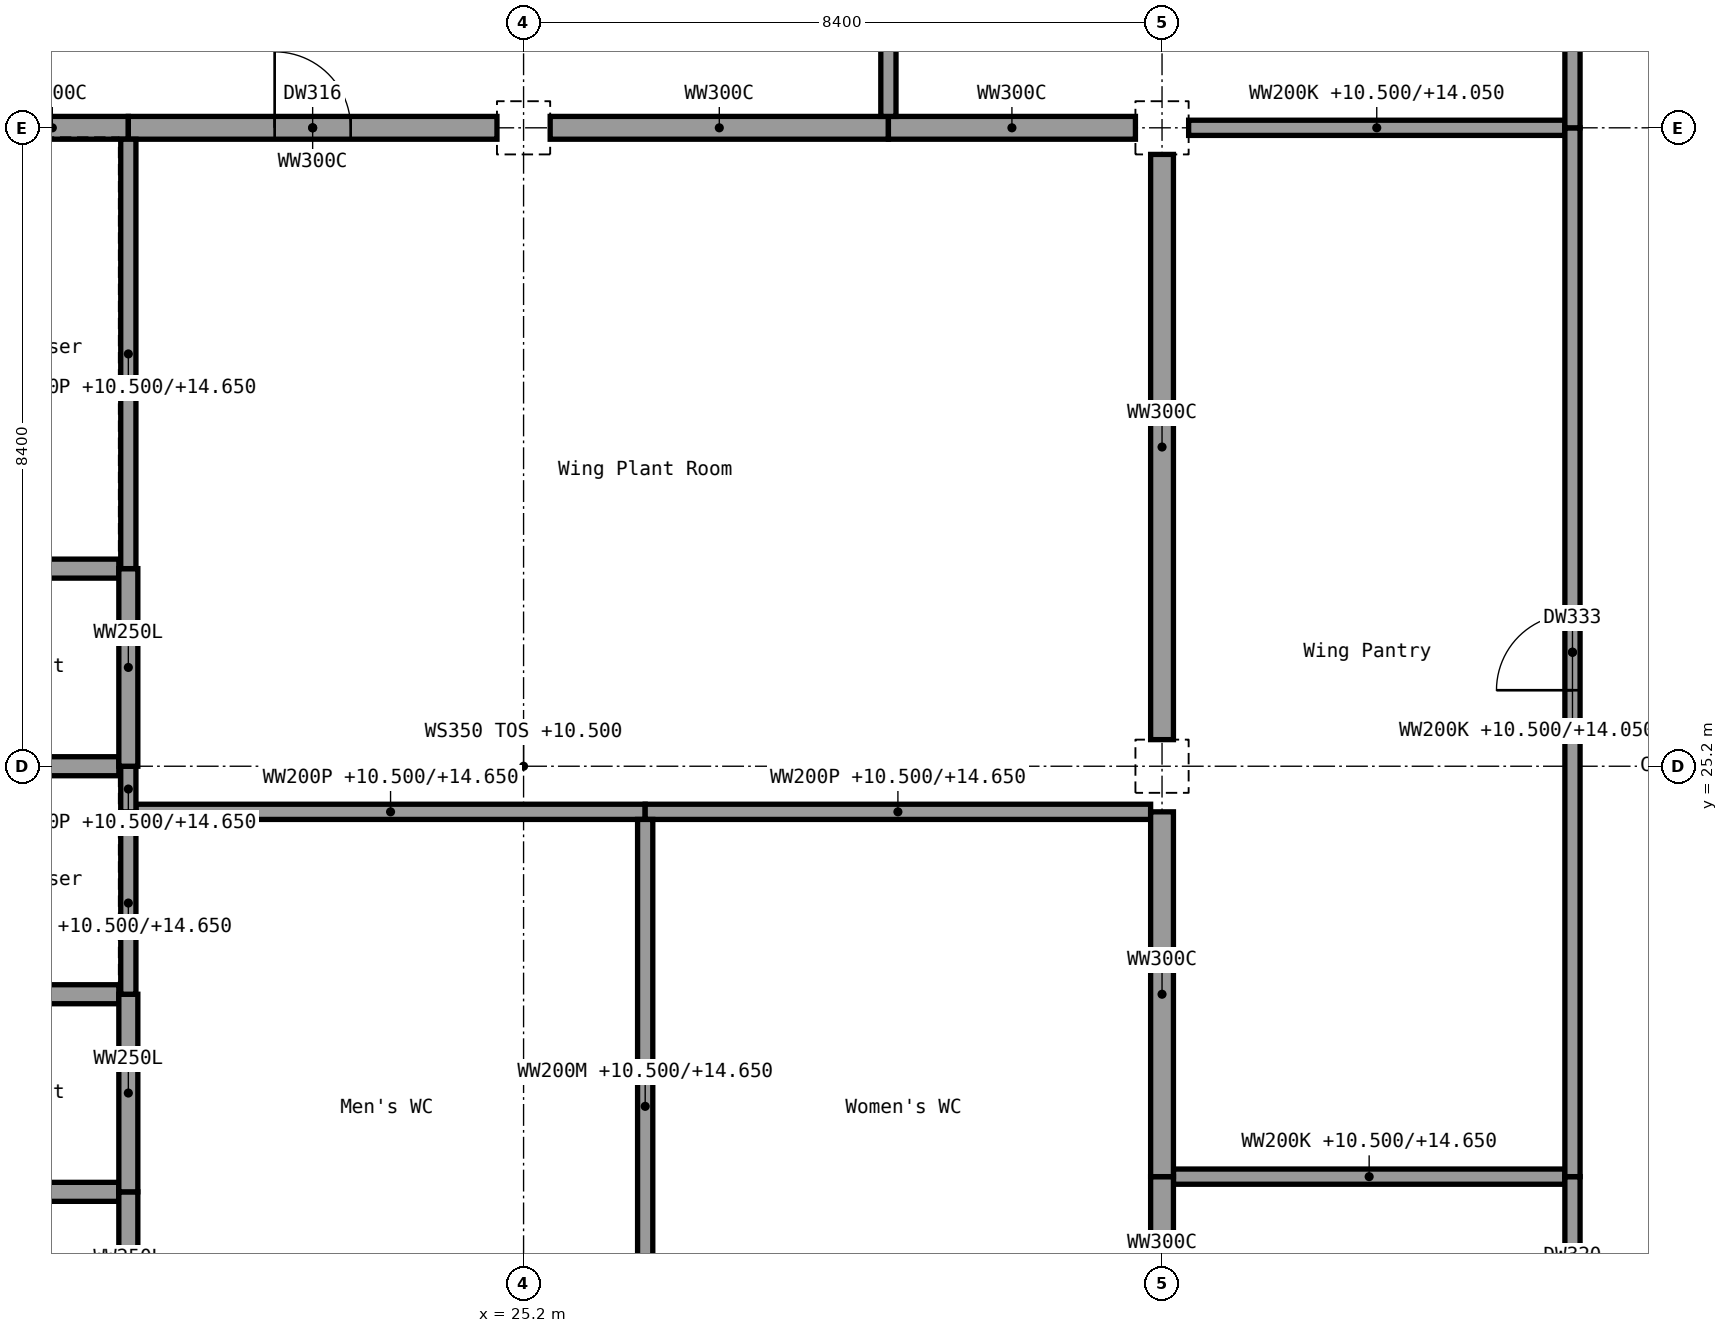
"""IFC4 building model, lengths in metres.
Left out: names, types, materials, properties, quantities, classifications, styles, units other than length and angle.
Written with IfcOpenShell. Run it as: python <this file> out.ifc"""

import sys

from ifc_helpers import new_model, si_unit, direction, frame, frame_2d, origin, origin_2d, place, context, subcontext, project, spatial, rectangle, extrude, element, fill, save


model = new_model("IFC4")
c1 = context("Model", 3, precision=1e-05, world=origin(), true_north=direction((0.0, 1.0)))
c2 = subcontext(c1, "Body", "Model", "MODEL_VIEW")
j1 = project(units=[si_unit("LENGTHUNIT", "METRE"), si_unit("PLANEANGLEUNIT", "RADIAN")], contexts=[c1])
p1 = place(None, origin())
s1 = spatial("IfcSite", under=j1, at=p1, CompositionType="ELEMENT")
p2 = place(p1, origin())
s2 = spatial("IfcBuilding", under=s1, at=p2, CompositionType="ELEMENT")
p3 = place(p2, frame((0.0, 0.0, 10.5)))
s3 = spatial("IfcBuildingStorey", under=s2, at=p3, CompositionType="ELEMENT", Elevation=10.5)
for number, where, z_axis, x_axis in (
    (1, (25.2, 33.6, 0.0), (0.0, 0.0, 1.0), (1.0, 0.0, 0.0)),
    (2, (33.6, 25.2, 0.0), (0.0, 0.0, 1.0), (1.0, 0.0, 0.0)),
    (3, (33.6, 33.6, 0.0), (0.0, 0.0, 1.0), (1.0, 0.0, 0.0)),
):
    element("IfcColumn", number, at=place(p3, frame(where, z_axis=z_axis, x_axis=x_axis)), inside=s3, PredefinedType="COLUMN", context=c2, shape_type="SweptSolid", body=[
        extrude(rectangle(XDim=0.7, YDim=0.7, at=origin_2d()), origin(), (0.0, 0.0, 1.0), 4.15),
    ])
p4 = place(p3, frame((16.925, 19.6, 0.0), z_axis=(0.0, 0.0, 1.0), x_axis=(1.0, 0.0, 0.0)))
e4 = element("IfcWall", 4, at=p4, inside=s3, PredefinedType="SHEAR", context=c2, shape_type="SweptSolid", body=[
    extrude(rectangle(XDim=2.95, YDim=0.25, at=frame_2d((1.475, 0.0))), origin(), (0.0, 0.0, 1.0), 4.15),
])
p5 = place(p3, frame((33.75, 19.8, 0.0), z_axis=(0.0, 0.0, 1.0), x_axis=(1.0, 0.0, 0.0)))
e5 = element("IfcWall", 5, at=p5, inside=s3, PredefinedType="SOLIDWALL", context=c2, shape_type="SweptSolid", body=[
    extrude(rectangle(XDim=5.15, YDim=0.2, at=frame_2d((2.575, 0.0))), origin(), (0.0, 0.0, 1.0), 4.15),
])
p6 = place(p3, frame((16.95, 22.2, 0.0), z_axis=(0.0, 0.0, 1.0), x_axis=(1.0, 0.0, 0.0)))
e6 = element("IfcWall", 6, at=p6, inside=s3, PredefinedType="SHEAR", context=c2, shape_type="SweptSolid", body=[
    extrude(rectangle(XDim=2.925, YDim=0.25, at=frame_2d((1.462, 0.0))), origin(), (0.0, 0.0, 1.0), 4.15),
])
p7 = place(p3, frame((20.1, 24.6, 0.0), z_axis=(0.0, 0.0, 1.0), x_axis=(1.0, 0.0, 0.0)))
e7 = element("IfcWall", 7, at=p7, inside=s3, PredefinedType="SOLIDWALL", context=c2, shape_type="SweptSolid", body=[
    extrude(rectangle(XDim=6.7, YDim=0.2, at=frame_2d((3.35, 0.0))), origin(), (0.0, 0.0, 1.0), 4.15),
])
p8 = place(p3, frame((26.8, 24.6, 0.0), z_axis=(0.0, 0.0, 1.0), x_axis=(1.0, 0.0, 0.0)))
e8 = element("IfcWall", 8, at=p8, inside=s3, PredefinedType="SOLIDWALL", context=c2, shape_type="SweptSolid", body=[
    extrude(rectangle(XDim=6.65, YDim=0.2, at=frame_2d((3.325, 0.0))), origin(), (0.0, 0.0, 1.0), 4.15),
])
p9 = place(p3, frame((17.15, 25.2, 0.0), z_axis=(0.0, 0.0, 1.0), x_axis=(1.0, 0.0, 0.0)))
e9 = element("IfcWall", 9, at=p9, inside=s3, PredefinedType="SHEAR", context=c2, shape_type="SweptSolid", body=[
    extrude(rectangle(XDim=2.725, YDim=0.25, at=frame_2d((1.363, 0.0))), origin(), (0.0, 0.0, 1.0), 4.15),
])
p10 = place(p3, frame((16.95, 27.8, 0.0), z_axis=(0.0, 0.0, 1.0), x_axis=(1.0, 0.0, 0.0)))
e10 = element("IfcWall", 10, at=p10, inside=s3, PredefinedType="SHEAR", context=c2, shape_type="SweptSolid", body=[
    extrude(rectangle(XDim=2.925, YDim=0.25, at=frame_2d((1.462, 0.0))), origin(), (0.0, 0.0, 1.0), 4.15),
])
p11 = place(p3, frame((18.0, 33.6, 0.0), z_axis=(0.0, 0.0, 1.0), x_axis=(1.0, 0.0, 0.0)))
e11 = element("IfcWall", 11, at=p11, inside=s3, PredefinedType="SHEAR", context=c2, shape_type="SweptSolid", body=[
    extrude(rectangle(XDim=2.0, YDim=0.3, at=frame_2d((1.0, 0.0))), origin(), (0.0, 0.0, 1.0), 4.15),
])
p12 = place(p3, frame((20.0, 33.6, 0.0), z_axis=(0.0, 0.0, 1.0), x_axis=(1.0, 0.0, 0.0)))
e12 = element("IfcWall", 12, at=p12, inside=s3, PredefinedType="SHEAR", context=c2, shape_type="SweptSolid", body=[
    extrude(rectangle(XDim=4.85, YDim=0.3, at=frame_2d((2.425, 0.0))), origin(), (0.0, 0.0, 1.0), 4.15),
])
p13 = place(p12, frame((1.925, 0.0, 0.0)))
e13 = element("IfcOpeningElement", 13, at=p13, cuts=e12, PredefinedType="OPENING", context=c2, shape_type="SweptSolid", body=[
    extrude(rectangle(XDim=1.0, YDim=2.1, at=frame_2d((0.5, 1.05))), frame((0.0, 0.15, 0.0), z_axis=(0.0, -1.0, 0.0), x_axis=(1.0, 0.0, 0.0)), (0.0, 0.0, 1.0), 0.3),
])
p14 = place(p3, frame((25.55, 33.6, 0.0), z_axis=(0.0, 0.0, 1.0), x_axis=(1.0, 0.0, 0.0)))
e14 = element("IfcWall", 14, at=p14, inside=s3, PredefinedType="SHEAR", context=c2, shape_type="SweptSolid", body=[
    extrude(rectangle(XDim=4.45, YDim=0.3, at=frame_2d((2.225, 0.0))), origin(), (0.0, 0.0, 1.0), 4.15),
])
p15 = place(p3, frame((30.0, 33.6, 0.0), z_axis=(0.0, 0.0, 1.0), x_axis=(1.0, 0.0, 0.0)))
e15 = element("IfcWall", 15, at=p15, inside=s3, PredefinedType="SHEAR", context=c2, shape_type="SweptSolid", body=[
    extrude(rectangle(XDim=3.25, YDim=0.3, at=frame_2d((1.625, 0.0))), origin(), (0.0, 0.0, 1.0), 4.15),
])
p16 = place(p3, frame((33.95, 33.6, 0.0), z_axis=(0.0, 0.0, 1.0), x_axis=(1.0, 0.0, 0.0)))
e16 = element("IfcWall", 16, at=p16, inside=s3, PredefinedType="SOLIDWALL", context=c2, shape_type="SweptSolid", body=[
    extrude(rectangle(XDim=4.95, YDim=0.2, at=frame_2d((2.475, 0.0))), origin(), (0.0, 0.0, 1.0), 3.55),
])
p17 = place(p3, frame((20.0, 16.95, 0.0), z_axis=(0.0, 0.0, 1.0), x_axis=(0.0, 1.0, 0.0)))
e17 = element("IfcWall", 17, at=p17, inside=s3, PredefinedType="SHEAR", context=c2, shape_type="SweptSolid", body=[
    extrude(rectangle(XDim=2.65, YDim=0.25, at=frame_2d((1.325, 0.0))), origin(), (0.0, 0.0, 1.0), 4.15),
])
p18 = place(p3, frame((20.0, 19.6, 0.0), z_axis=(0.0, 0.0, 1.0), x_axis=(0.0, 1.0, 0.0)))
e18 = element("IfcWall", 18, at=p18, inside=s3, PredefinedType="SHEAR", context=c2, shape_type="SweptSolid", body=[
    extrude(rectangle(XDim=2.6, YDim=0.25, at=frame_2d((1.3, 0.0))), origin(), (0.0, 0.0, 1.0), 4.15),
])
p19 = place(p3, frame((20.0, 22.2, 0.0), z_axis=(0.0, 0.0, 1.0), x_axis=(0.0, 1.0, 0.0)))
e19 = element("IfcWall", 19, at=p19, inside=s3, PredefinedType="SOLIDWALL", context=c2, shape_type="SweptSolid", body=[
    extrude(rectangle(XDim=2.4, YDim=0.2, at=frame_2d((1.2, 0.0))), origin(), (0.0, 0.0, 1.0), 4.15),
])
p20 = place(p3, frame((20.0, 24.6, 0.0), z_axis=(0.0, 0.0, 1.0), x_axis=(0.0, 1.0, 0.0)))
e20 = element("IfcWall", 20, at=p20, inside=s3, PredefinedType="SOLIDWALL", context=c2, shape_type="SweptSolid", body=[
    extrude(rectangle(XDim=0.6, YDim=0.2, at=frame_2d((0.3, 0.0))), origin(), (0.0, 0.0, 1.0), 4.15),
])
p21 = place(p3, frame((20.0, 25.2, 0.0), z_axis=(0.0, 0.0, 1.0), x_axis=(0.0, 1.0, 0.0)))
e21 = element("IfcWall", 21, at=p21, inside=s3, PredefinedType="SHEAR", context=c2, shape_type="SweptSolid", body=[
    extrude(rectangle(XDim=2.6, YDim=0.25, at=frame_2d((1.3, 0.0))), origin(), (0.0, 0.0, 1.0), 4.15),
])
p22 = place(p3, frame((20.0, 27.8, 0.0), z_axis=(0.0, 0.0, 1.0), x_axis=(0.0, 1.0, 0.0)))
e22 = element("IfcWall", 22, at=p22, inside=s3, PredefinedType="SOLIDWALL", context=c2, shape_type="SweptSolid", body=[
    extrude(rectangle(XDim=5.65, YDim=0.2, at=frame_2d((2.825, 0.0))), origin(), (0.0, 0.0, 1.0), 4.15),
])
p23 = place(p3, frame((26.8, 16.95, 0.0), z_axis=(0.0, 0.0, 1.0), x_axis=(0.0, 1.0, 0.0)))
e23 = element("IfcWall", 23, at=p23, inside=s3, PredefinedType="PARTITIONING", context=c2, shape_type="SweptSolid", body=[
    extrude(rectangle(XDim=7.55, YDim=0.2, at=frame_2d((3.775, 0.0))), origin(), (0.0, 0.0, 1.0), 4.15),
])
p24 = place(p3, frame((30.0, 33.75, 0.0), z_axis=(0.0, 0.0, 1.0), x_axis=(0.0, 1.0, 0.0)))
e24 = element("IfcWall", 24, at=p24, inside=s3, PredefinedType="SOLIDWALL", context=c2, shape_type="SweptSolid", body=[
    extrude(rectangle(XDim=5.15, YDim=0.2, at=frame_2d((2.575, 0.0))), origin(), (0.0, 0.0, 1.0), 4.15),
])
p25 = place(p3, frame((33.6, 17.15, 0.0), z_axis=(0.0, 0.0, 1.0), x_axis=(0.0, 1.0, 0.0)))
e25 = element("IfcWall", 25, at=p25, inside=s3, PredefinedType="SHEAR", context=c2, shape_type="SweptSolid", body=[
    extrude(rectangle(XDim=2.65, YDim=0.3, at=frame_2d((1.325, 0.0))), origin(), (0.0, 0.0, 1.0), 4.15),
])
p26 = place(p3, frame((33.6, 19.8, 0.0), z_axis=(0.0, 0.0, 1.0), x_axis=(0.0, 1.0, 0.0)))
e26 = element("IfcWall", 26, at=p26, inside=s3, PredefinedType="SHEAR", context=c2, shape_type="SweptSolid", body=[
    extrude(rectangle(XDim=4.8, YDim=0.3, at=frame_2d((2.4, 0.0))), origin(), (0.0, 0.0, 1.0), 4.15),
])
p27 = place(p3, frame((33.6, 25.55, 0.0), z_axis=(0.0, 0.0, 1.0), x_axis=(0.0, 1.0, 0.0)))
e27 = element("IfcWall", 27, at=p27, inside=s3, PredefinedType="SHEAR", context=c2, shape_type="SweptSolid", body=[
    extrude(rectangle(XDim=7.7, YDim=0.3, at=frame_2d((3.85, 0.0))), origin(), (0.0, 0.0, 1.0), 4.15),
])
p28 = place(p3, frame((39.0, 16.8, 0.0), z_axis=(0.0, 0.0, 1.0), x_axis=(0.0, 1.0, 0.0)))
e28 = element("IfcWall", 28, at=p28, inside=s3, PredefinedType="PARTITIONING", context=c2, shape_type="SweptSolid", body=[
    extrude(rectangle(XDim=3.0, YDim=0.2, at=frame_2d((1.5, 0.0))), origin(), (0.0, 0.0, 1.0), 3.55),
])
p29 = place(p28, frame((1.0, 0.0, 0.0)))
e29 = element("IfcOpeningElement", 29, at=p29, cuts=e28, PredefinedType="OPENING", context=c2, shape_type="SweptSolid", body=[
    extrude(rectangle(XDim=1.0, YDim=2.1, at=frame_2d((0.5, 1.05))), frame((0.0, 0.1, 0.0), z_axis=(0.0, -1.0, 0.0), x_axis=(1.0, 0.0, 0.0)), (0.0, 0.0, 1.0), 0.2),
])
p30 = place(p3, frame((39.0, 19.8, 0.0), z_axis=(0.0, 0.0, 1.0), x_axis=(0.0, 1.0, 0.0)))
e30 = element("IfcWall", 30, at=p30, inside=s3, PredefinedType="SOLIDWALL", context=c2, shape_type="SweptSolid", body=[
    extrude(rectangle(XDim=13.8, YDim=0.2, at=frame_2d((6.9, 0.0))), origin(), (0.0, 0.0, 1.0), 3.55),
])
p31 = place(p30, frame((6.4, 0.0, 0.0)))
e31 = element("IfcOpeningElement", 31, at=p31, cuts=e30, PredefinedType="OPENING", context=c2, shape_type="SweptSolid", body=[
    extrude(rectangle(XDim=1.0, YDim=2.1, at=frame_2d((0.5, 1.05))), frame((0.0, 0.1, 0.0), z_axis=(0.0, -1.0, 0.0), x_axis=(1.0, 0.0, 0.0)), (0.0, 0.0, 1.0), 0.2),
])
p32 = place(p3, frame((39.0, 33.6, 0.0), z_axis=(0.0, 0.0, 1.0), x_axis=(0.0, 1.0, 0.0)))
e32 = element("IfcWall", 32, at=p32, inside=s3, PredefinedType="PARTITIONING", context=c2, shape_type="SweptSolid", body=[
    extrude(rectangle(XDim=5.4, YDim=0.2, at=frame_2d((2.7, 0.0))), origin(), (0.0, 0.0, 1.0), 3.55),
])
p33 = place(p13, origin())
e33 = element("IfcDoor", 33, at=p33, inside=s3, OperationType="SINGLE_SWING_LEFT", PredefinedType="DOOR", context=c2, shape_type="SweptSolid", body=[
    extrude(rectangle(XDim=1.0, YDim=2.1, at=frame_2d((0.5, 1.05))), frame((0.0, 0.025, 0.0), z_axis=(0.0, -1.0, 0.0), x_axis=(1.0, 0.0, 0.0)), (0.0, 0.0, 1.0), 0.05),
])
fill(e13, e33)
p34 = place(p31, origin())
e34 = element("IfcDoor", 34, at=p34, inside=s3, OperationType="SINGLE_SWING_RIGHT", PredefinedType="DOOR", context=c2, shape_type="SweptSolid", body=[
    extrude(rectangle(XDim=1.0, YDim=2.1, at=frame_2d((0.5, 1.05))), frame((0.0, 0.025, 0.0), z_axis=(0.0, -1.0, 0.0), x_axis=(1.0, 0.0, 0.0)), (0.0, 0.0, 1.0), 0.05),
])
fill(e31, e34)
save(model, sys.argv[1])
